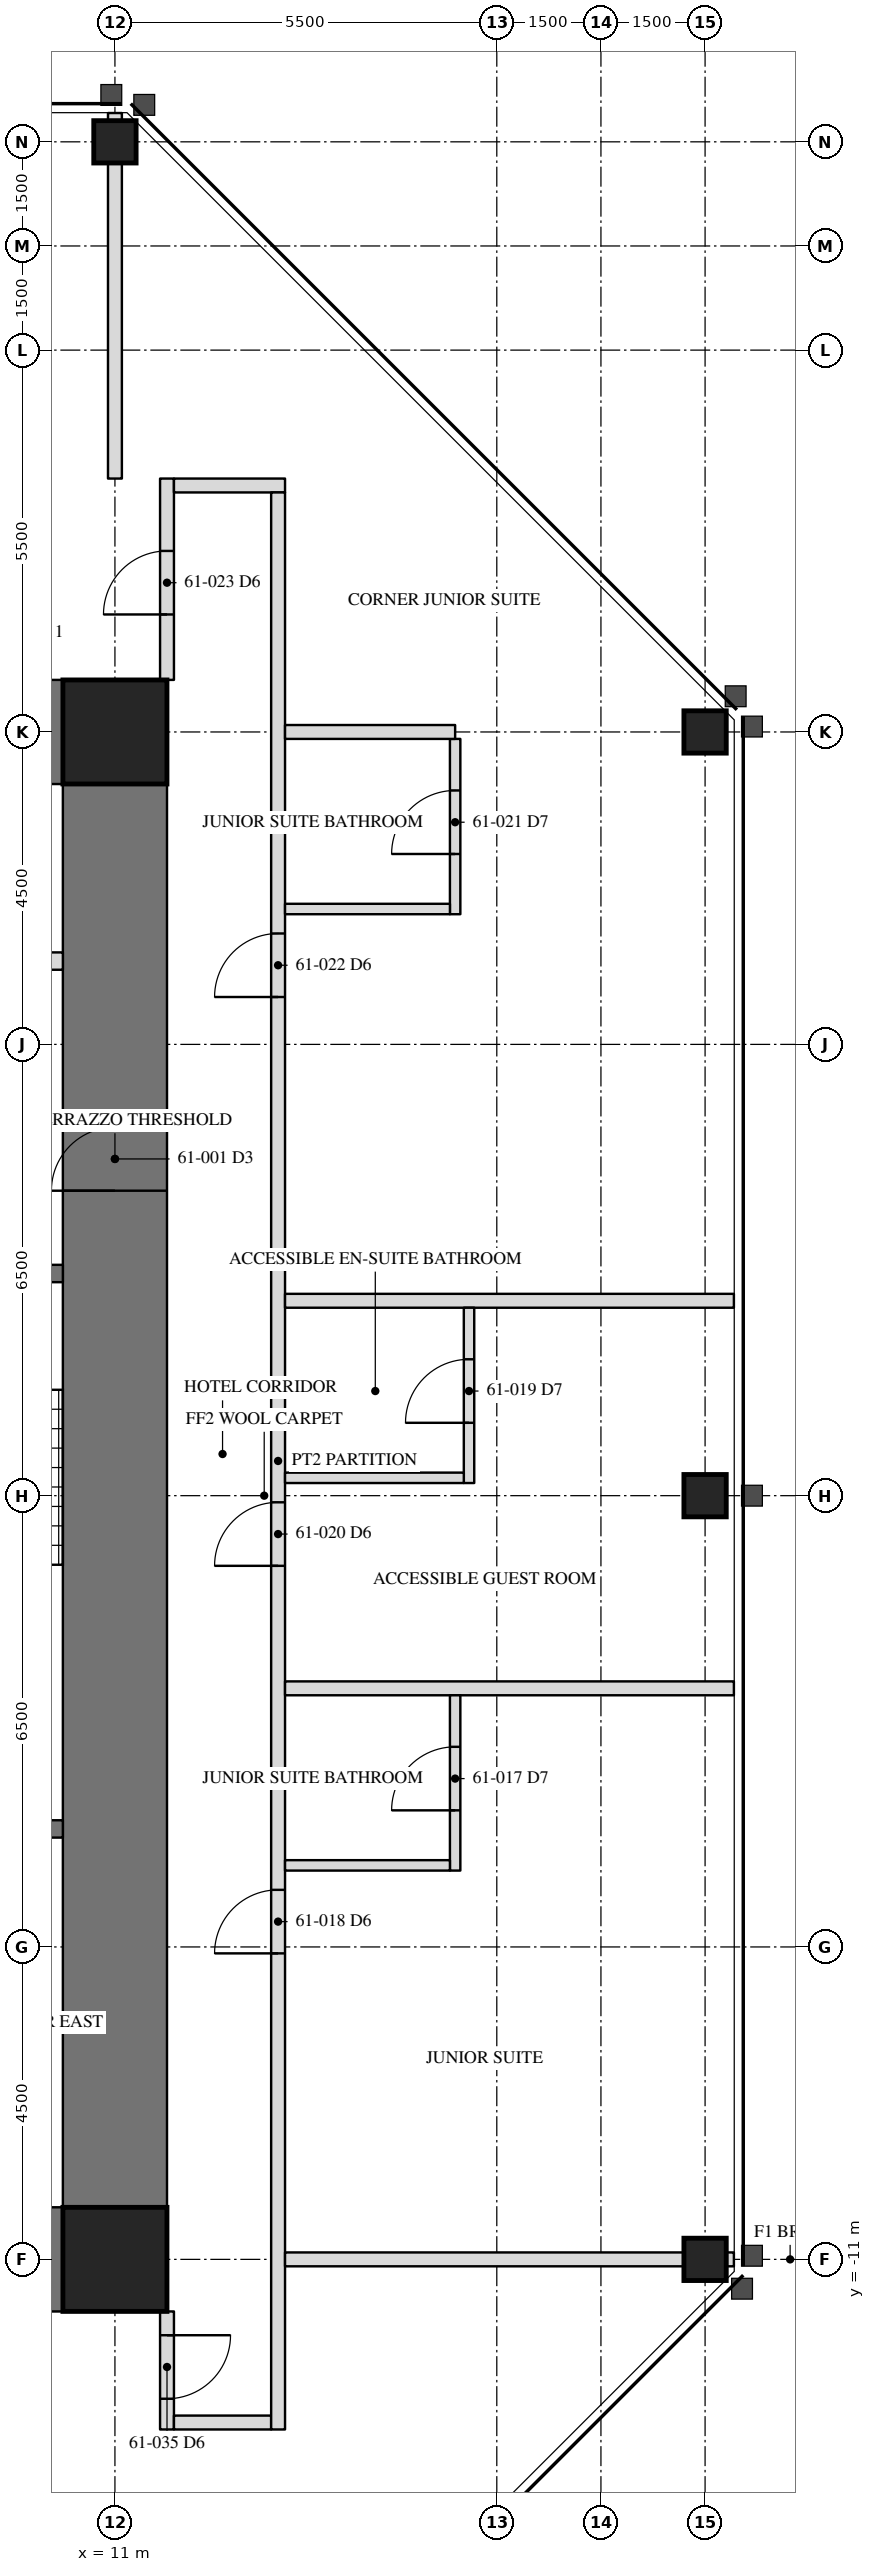
"""IFC4 building model, lengths in metres.
Left out: names, types, materials, properties, quantities, classifications, styles, units other than length and angle.
Written with IfcOpenShell. Run it as: python <this file> out.ifc"""

import sys

from ifc_helpers import new_model, si_unit, direction, frame, frame_2d, origin, origin_2d, place, context, subcontext, project, spatial, rectangle, hollow_rectangle, extrude, element, fill, save


model = new_model("IFC4")
c1 = context("Model", 3, precision=1e-05, world=origin(), true_north=direction((0.0, 1.0)))
c2 = subcontext(c1, "Body", "Model", "MODEL_VIEW")
j1 = project(units=[si_unit("LENGTHUNIT", "METRE"), si_unit("PLANEANGLEUNIT", "RADIAN")], contexts=[c1])
p1 = place(None, origin())
s1 = spatial("IfcSite", under=j1, at=p1, CompositionType="ELEMENT")
p2 = place(p1, origin())
s2 = spatial("IfcBuilding", under=s1, at=p2, CompositionType="ELEMENT")
p3 = place(p2, frame((0.0, 0.0, 250.2)))
s3 = spatial("IfcBuildingStorey", under=s2, at=p3, CompositionType="ELEMENT", Elevation=250.2)
for number, where, z_axis, x_axis in (
    (1, (19.5, -11.0, 0.0), (0.0, 0.0, 1.0), (0.0, 1.0, 0.0)),
    (2, (19.5, 0.0, 0.0), (0.0, 0.0, 1.0), (0.0, 1.0, 0.0)),
    (3, (19.5, 11.0, 0.0), (0.0, 0.0, 1.0), (0.0, 1.0, 0.0)),
    (4, (11.0, 19.5, 0.0), (0.0, 0.0, 1.0), (1.0, 0.0, 0.0)),
):
    element("IfcColumn", number, at=place(p3, frame(where, z_axis=z_axis, x_axis=x_axis)), inside=s3, PredefinedType="COLUMN", context=c2, shape_type="SweptSolid", body=[
        extrude(hollow_rectangle(XDim=0.61, YDim=0.61, WallThickness=0.051, at=origin_2d()), origin(), (0.0, 0.0, 1.0), 3.5),
    ])
p4 = place(p3, frame((11.0, -11.0, 0.0), z_axis=(0.0, 0.0, 1.0), x_axis=(0.0, 1.0, 0.0)))
e5 = element("IfcWall", 5, at=p4, inside=s3, PredefinedType="SHEAR", context=c2, shape_type="SweptSolid", body=[
    extrude(rectangle(XDim=22.0, YDim=1.5, at=frame_2d((11.0, 0.0))), origin(), (0.0, 0.0, 1.0), 3.5),
])
p5 = place(p4, frame((15.393, 0.0, 0.0)))
e6 = element("IfcOpeningElement", 6, at=p5, cuts=e5, PredefinedType="OPENING", context=c2, shape_type="SweptSolid", body=[
    extrude(rectangle(XDim=0.915, YDim=2.134, at=frame_2d((0.458, 1.067))), frame((0.0, 0.76, 0.0), z_axis=(0.0, -1.0, 0.0), x_axis=(1.0, 0.0, 0.0)), (0.0, 0.0, 1.0), 1.52),
])
for number, where, z_axis, x_axis in (
    (7, (11.0, 11.0, 0.0), (0.0, 0.0, 1.0), (-1.0, 0.0, 0.0)),
    (8, (6.5, -11.0, 0.0), (0.0, 0.0, 1.0), (1.0, 0.0, 0.0)),
):
    element("IfcWall", number, at=place(p3, frame(where, z_axis=z_axis, x_axis=x_axis)), inside=s3, PredefinedType="SHEAR", context=c2, shape_type="SweptSolid", body=[
        extrude(rectangle(XDim=4.5, YDim=1.5, at=frame_2d((2.25, 0.0))), origin(), (0.0, 0.0, 1.0), 3.5),
    ])
for number, where, z_axis, x_axis in (
    (9, (11.0, 11.0, 0.0), (0.0, 0.0, 1.0), (1.0, 0.0, 0.0)),
    (10, (11.0, -11.0, 0.0), (0.0, 0.0, 1.0), (1.0, 0.0, 0.0)),
):
    element("IfcColumn", number, at=place(p3, frame(where, z_axis=z_axis, x_axis=x_axis)), inside=s3, PredefinedType="COLUMN", context=c2, shape_type="SweptSolid", body=[
        extrude(hollow_rectangle(XDim=1.499, YDim=1.499, WallThickness=0.102, at=origin_2d()), origin(), (0.0, 0.0, 1.0), 3.5),
    ])
p6 = place(p3, frame((6.95, -4.8, 0.0), z_axis=(0.0, 0.0, 1.0), x_axis=(1.0, 0.0, 0.0)))
e11 = element("IfcWall", 11, at=p6, inside=s3, PredefinedType="SOLIDWALL", context=c2, shape_type="SweptSolid", body=[
    extrude(rectangle(XDim=3.3, YDim=0.25, at=frame_2d((1.65, 0.0))), origin(), (0.0, 0.0, 1.0), 3.31),
])
p7 = place(p3, frame((6.95, 3.2, 0.0), z_axis=(0.0, 0.0, 1.0), x_axis=(1.0, 0.0, 0.0)))
e12 = element("IfcWall", 12, at=p7, inside=s3, PredefinedType="SOLIDWALL", context=c2, shape_type="SweptSolid", body=[
    extrude(rectangle(XDim=3.3, YDim=0.25, at=frame_2d((1.65, 0.0))), origin(), (0.0, 0.0, 1.0), 3.31),
])
p8 = place(p7, frame((1.116, 0.0, 0.0)))
e13 = element("IfcOpeningElement", 13, at=p8, cuts=e12, PredefinedType="OPENING", context=c2, shape_type="SweptSolid", body=[
    extrude(rectangle(XDim=1.067, YDim=2.134, at=frame_2d((0.533, 1.067))), frame((0.0, 0.135, 0.0), z_axis=(0.0, -1.0, 0.0), x_axis=(1.0, 0.0, 0.0)), (0.0, 0.0, 1.0), 0.27),
])
p9 = place(p3, frame((6.95, 7.7, 0.0), z_axis=(0.0, 0.0, 1.0), x_axis=(1.0, 0.0, 0.0)))
e14 = element("IfcWall", 14, at=p9, inside=s3, PredefinedType="PARTITIONING", context=c2, shape_type="SweptSolid", body=[
    extrude(rectangle(XDim=3.3, YDim=0.25, at=frame_2d((1.65, 0.0))), origin(), (0.0, 0.0, 1.0), 3.31),
])
p10 = place(p9, frame((0.45, 0.0, 0.0)))
e15 = element("IfcOpeningElement", 15, at=p10, cuts=e14, PredefinedType="OPENING", context=c2, shape_type="SweptSolid", body=[
    extrude(rectangle(XDim=1.219, YDim=2.134, at=frame_2d((0.609, 1.067))), frame((0.0, 0.135, 0.0), z_axis=(0.0, -1.0, 0.0), x_axis=(1.0, 0.0, 0.0)), (0.0, 0.0, 1.0), 0.27),
])
p11 = place(p3, frame((11.75, 11.75, 0.0), z_axis=(0.0, 0.0, 1.0), x_axis=(0.0, 1.0, 0.0)))
e16 = element("IfcWall", 16, at=p11, inside=s3, PredefinedType="PARTITIONING", context=c2, shape_type="SweptSolid", body=[
    extrude(rectangle(XDim=2.9, YDim=0.2, at=frame_2d((1.45, 0.0))), origin(), (0.0, 0.0, 1.0), 3.31),
])
p12 = place(p11, frame((0.942, 0.0, 0.0)))
e17 = element("IfcOpeningElement", 17, at=p12, cuts=e16, PredefinedType="OPENING", context=c2, shape_type="SweptSolid", body=[
    extrude(rectangle(XDim=0.915, YDim=2.134, at=frame_2d((0.458, 1.067))), frame((0.0, 0.11, 0.0), z_axis=(0.0, -1.0, 0.0), x_axis=(1.0, 0.0, 0.0)), (0.0, 0.0, 1.0), 0.22),
])
p13 = place(p3, frame((13.45, 14.55, 0.0), z_axis=(0.0, 0.0, 1.0), x_axis=(-1.0, 0.0, 0.0)))
e18 = element("IfcWall", 18, at=p13, inside=s3, PredefinedType="PARTITIONING", context=c2, shape_type="SweptSolid", body=[
    extrude(rectangle(XDim=1.6, YDim=0.2, at=frame_2d((0.8, 0.0))), origin(), (0.0, 0.0, 1.0), 3.31),
])
p14 = place(p3, frame((11.75, -11.75, 0.0), z_axis=(0.0, 0.0, 1.0), x_axis=(0.0, -1.0, 0.0)))
e19 = element("IfcWall", 19, at=p14, inside=s3, PredefinedType="PARTITIONING", context=c2, shape_type="SweptSolid", body=[
    extrude(rectangle(XDim=1.7, YDim=0.2, at=frame_2d((0.85, 0.0))), origin(), (0.0, 0.0, 1.0), 3.31),
])
p15 = place(p14, frame((0.343, 0.0, 0.0)))
e20 = element("IfcOpeningElement", 20, at=p15, cuts=e19, PredefinedType="OPENING", context=c2, shape_type="SweptSolid", body=[
    extrude(rectangle(XDim=0.915, YDim=2.134, at=frame_2d((0.458, 1.067))), frame((0.0, 0.11, 0.0), z_axis=(0.0, -1.0, 0.0), x_axis=(1.0, 0.0, 0.0)), (0.0, 0.0, 1.0), 0.22),
])
p16 = place(p3, frame((11.85, -13.35, 0.0), z_axis=(0.0, 0.0, 1.0), x_axis=(1.0, 0.0, 0.0)))
e21 = element("IfcWall", 21, at=p16, inside=s3, PredefinedType="PARTITIONING", context=c2, shape_type="SweptSolid", body=[
    extrude(rectangle(XDim=1.4, YDim=0.2, at=frame_2d((0.7, 0.0))), origin(), (0.0, 0.0, 1.0), 3.31),
])
p17 = place(p3, frame((13.35, -13.45, 0.0), z_axis=(0.0, 0.0, 1.0), x_axis=(0.0, 1.0, 0.0)))
e22 = element("IfcWall", 22, at=p17, inside=s3, PredefinedType="PARTITIONING", context=c2, shape_type="SweptSolid", body=[
    extrude(rectangle(XDim=27.9, YDim=0.2, at=frame_2d((13.95, 0.0))), origin(), (0.0, 0.0, 1.0), 3.31),
])
p18 = place(p17, frame((6.857, 0.0, 0.0)))
e23 = element("IfcOpeningElement", 23, at=p18, cuts=e22, PredefinedType="OPENING", context=c2, shape_type="SweptSolid", body=[
    extrude(rectangle(XDim=0.915, YDim=2.134, at=frame_2d((0.458, 1.067))), frame((0.0, 0.11, 0.0), z_axis=(0.0, -1.0, 0.0), x_axis=(1.0, 0.0, 0.0)), (0.0, 0.0, 1.0), 0.22),
])
p19 = place(p17, frame((12.439, 0.0, 0.0)))
e24 = element("IfcOpeningElement", 24, at=p19, cuts=e22, PredefinedType="OPENING", context=c2, shape_type="SweptSolid", body=[
    extrude(rectangle(XDim=0.915, YDim=2.134, at=frame_2d((0.458, 1.067))), frame((0.0, 0.11, 0.0), z_axis=(0.0, -1.0, 0.0), x_axis=(1.0, 0.0, 0.0)), (0.0, 0.0, 1.0), 0.22),
])
p20 = place(p17, frame((20.633, 0.0, 0.0)))
e25 = element("IfcOpeningElement", 25, at=p20, cuts=e22, PredefinedType="OPENING", context=c2, shape_type="SweptSolid", body=[
    extrude(rectangle(XDim=0.915, YDim=2.134, at=frame_2d((0.458, 1.067))), frame((0.0, 0.11, 0.0), z_axis=(0.0, -1.0, 0.0), x_axis=(1.0, 0.0, 0.0)), (0.0, 0.0, 1.0), 0.22),
])
p21 = place(p3, frame((13.45, -11.0, 0.0), z_axis=(0.0, 0.0, 1.0), x_axis=(1.0, 0.0, 0.0)))
e26 = element("IfcWall", 26, at=p21, inside=s3, PredefinedType="PARTITIONING", context=c2, shape_type="SweptSolid", body=[
    extrude(rectangle(XDim=6.465, YDim=0.2, at=frame_2d((3.232, 0.0))), origin(), (0.0, 0.0, 1.0), 2.802),
])
for number, where, z_axis, x_axis in (
    (27, (13.45, -2.775, 0.0), (0.0, 0.0, 1.0), (1.0, 0.0, 0.0)),
    (28, (13.45, 2.807, 0.0), (0.0, 0.0, 1.0), (1.0, 0.0, 0.0)),
):
    element("IfcWall", number, at=place(p3, frame(where, z_axis=z_axis, x_axis=x_axis)), inside=s3, PredefinedType="PARTITIONING", context=c2, shape_type="SweptSolid", body=[
        extrude(rectangle(XDim=6.465, YDim=0.2, at=frame_2d((3.232, 0.0))), origin(), (0.0, 0.0, 1.0), 3.31),
    ])
p22 = place(p3, frame((15.9, -5.4, 0.0), z_axis=(0.0, 0.0, 1.0), x_axis=(0.0, 1.0, 0.0)))
e29 = element("IfcWall", 29, at=p22, inside=s3, PredefinedType="PARTITIONING", context=c2, shape_type="SweptSolid", body=[
    extrude(rectangle(XDim=2.525, YDim=0.15, at=frame_2d((1.262, 0.0))), origin(), (0.0, 0.0, 1.0), 3.31),
])
p23 = place(p22, frame((0.867, 0.0, 0.0)))
e30 = element("IfcOpeningElement", 30, at=p23, cuts=e29, PredefinedType="OPENING", context=c2, shape_type="SweptSolid", body=[
    extrude(rectangle(XDim=0.915, YDim=2.032, at=frame_2d((0.458, 1.016))), frame((0.0, 0.085, 0.0), z_axis=(0.0, -1.0, 0.0), x_axis=(1.0, 0.0, 0.0)), (0.0, 0.0, 1.0), 0.17),
])
p24 = place(p3, frame((13.45, -5.325, 0.0), z_axis=(0.0, 0.0, 1.0), x_axis=(1.0, 0.0, 0.0)))
e31 = element("IfcWall", 31, at=p24, inside=s3, PredefinedType="PARTITIONING", context=c2, shape_type="SweptSolid", body=[
    extrude(rectangle(XDim=2.375, YDim=0.15, at=frame_2d((1.188, 0.0))), origin(), (0.0, 0.0, 1.0), 3.31),
])
p25 = place(p3, frame((16.1, 0.182, 0.0), z_axis=(0.0, 0.0, 1.0), x_axis=(0.0, 1.0, 0.0)))
e32 = element("IfcWall", 32, at=p25, inside=s3, PredefinedType="PARTITIONING", context=c2, shape_type="SweptSolid", body=[
    extrude(rectangle(XDim=2.525, YDim=0.15, at=frame_2d((1.263, 0.0))), origin(), (0.0, 0.0, 1.0), 3.31),
])
p26 = place(p25, frame((0.867, 0.0, 0.0)))
e33 = element("IfcOpeningElement", 33, at=p26, cuts=e32, PredefinedType="OPENING", context=c2, shape_type="SweptSolid", body=[
    extrude(rectangle(XDim=0.915, YDim=2.032, at=frame_2d((0.458, 1.016))), frame((0.0, 0.085, 0.0), z_axis=(0.0, -1.0, 0.0), x_axis=(1.0, 0.0, 0.0)), (0.0, 0.0, 1.0), 0.17),
])
p27 = place(p3, frame((13.45, 0.257, 0.0), z_axis=(0.0, 0.0, 1.0), x_axis=(1.0, 0.0, 0.0)))
e34 = element("IfcWall", 34, at=p27, inside=s3, PredefinedType="PARTITIONING", context=c2, shape_type="SweptSolid", body=[
    extrude(rectangle(XDim=2.575, YDim=0.15, at=frame_2d((1.288, 0.0))), origin(), (0.0, 0.0, 1.0), 3.31),
])
p28 = place(p3, frame((15.9, 8.375, 0.0), z_axis=(0.0, 0.0, 1.0), x_axis=(0.0, 1.0, 0.0)))
e35 = element("IfcWall", 35, at=p28, inside=s3, PredefinedType="PARTITIONING", context=c2, shape_type="SweptSolid", body=[
    extrude(rectangle(XDim=2.525, YDim=0.15, at=frame_2d((1.262, 0.0))), origin(), (0.0, 0.0, 1.0), 3.31),
])
p29 = place(p28, frame((0.867, 0.0, 0.0)))
e36 = element("IfcOpeningElement", 36, at=p29, cuts=e35, PredefinedType="OPENING", context=c2, shape_type="SweptSolid", body=[
    extrude(rectangle(XDim=0.915, YDim=2.032, at=frame_2d((0.458, 1.016))), frame((0.0, 0.085, 0.0), z_axis=(0.0, -1.0, 0.0), x_axis=(1.0, 0.0, 0.0)), (0.0, 0.0, 1.0), 0.17),
])
p30 = place(p3, frame((13.45, 8.45, 0.0), z_axis=(0.0, 0.0, 1.0), x_axis=(1.0, 0.0, 0.0)))
e37 = element("IfcWall", 37, at=p30, inside=s3, PredefinedType="PARTITIONING", context=c2, shape_type="SweptSolid", body=[
    extrude(rectangle(XDim=2.375, YDim=0.15, at=frame_2d((1.188, 0.0))), origin(), (0.0, 0.0, 1.0), 3.31),
])
p31 = place(p3, frame((13.45, 11.0, 0.0), z_axis=(0.0, 0.0, 1.0), x_axis=(1.0, 0.0, 0.0)))
e38 = element("IfcWall", 38, at=p31, inside=s3, PredefinedType="PARTITIONING", context=c2, shape_type="SweptSolid", body=[
    extrude(rectangle(XDim=2.45, YDim=0.2, at=frame_2d((1.225, 0.0))), origin(), (0.0, 0.0, 1.0), 2.802),
])
p32 = place(p3, frame((11.0, 14.65, 0.0), z_axis=(0.0, 0.0, 1.0), x_axis=(0.0, 1.0, 0.0)))
e39 = element("IfcWall", 39, at=p32, inside=s3, PredefinedType="PARTITIONING", context=c2, shape_type="SweptSolid", body=[
    extrude(rectangle(XDim=5.265, YDim=0.2, at=frame_2d((2.633, 0.0))), origin(), (0.0, 0.0, 1.0), 2.802),
])
p33 = place(p5, origin())
e40 = element("IfcDoor", 40, at=p33, inside=s3, OperationType="SINGLE_SWING_RIGHT", PredefinedType="DOOR", context=c2, shape_type="SweptSolid", body=[
    extrude(rectangle(XDim=0.915, YDim=2.134, at=frame_2d((0.458, 1.067))), frame((0.0, -0.675, 0.0), z_axis=(0.0, -1.0, 0.0), x_axis=(1.0, 0.0, 0.0)), (0.0, 0.0, 1.0), 0.05),
])
fill(e6, e40)
p34 = place(p23, origin())
e41 = element("IfcDoor", 41, at=p34, inside=s3, OperationType="SINGLE_SWING_LEFT", PredefinedType="DOOR", context=c2, shape_type="SweptSolid", body=[
    extrude(rectangle(XDim=0.915, YDim=2.032, at=frame_2d((0.458, 1.016))), frame((0.0, 0.025, 0.0), z_axis=(0.0, -1.0, 0.0), x_axis=(1.0, 0.0, 0.0)), (0.0, 0.0, 1.0), 0.05),
])
fill(e30, e41)
p35 = place(p18, origin())
e42 = element("IfcDoor", 42, at=p35, inside=s3, OperationType="SINGLE_SWING_LEFT", PredefinedType="DOOR", context=c2, shape_type="SweptSolid", body=[
    extrude(rectangle(XDim=0.915, YDim=2.134, at=frame_2d((0.458, 1.067))), frame((0.0, 0.025, 0.0), z_axis=(0.0, -1.0, 0.0), x_axis=(1.0, 0.0, 0.0)), (0.0, 0.0, 1.0), 0.05),
])
fill(e23, e42)
p36 = place(p26, origin())
e43 = element("IfcDoor", 43, at=p36, inside=s3, OperationType="SINGLE_SWING_LEFT", PredefinedType="DOOR", context=c2, shape_type="SweptSolid", body=[
    extrude(rectangle(XDim=0.915, YDim=2.032, at=frame_2d((0.458, 1.016))), frame((0.0, 0.025, 0.0), z_axis=(0.0, -1.0, 0.0), x_axis=(1.0, 0.0, 0.0)), (0.0, 0.0, 1.0), 0.05),
])
fill(e33, e43)
p37 = place(p19, origin())
e44 = element("IfcDoor", 44, at=p37, inside=s3, OperationType="SINGLE_SWING_LEFT", PredefinedType="DOOR", context=c2, shape_type="SweptSolid", body=[
    extrude(rectangle(XDim=0.915, YDim=2.134, at=frame_2d((0.458, 1.067))), frame((0.0, 0.025, 0.0), z_axis=(0.0, -1.0, 0.0), x_axis=(1.0, 0.0, 0.0)), (0.0, 0.0, 1.0), 0.05),
])
fill(e24, e44)
p38 = place(p29, origin())
e45 = element("IfcDoor", 45, at=p38, inside=s3, OperationType="SINGLE_SWING_LEFT", PredefinedType="DOOR", context=c2, shape_type="SweptSolid", body=[
    extrude(rectangle(XDim=0.915, YDim=2.032, at=frame_2d((0.458, 1.016))), frame((0.0, 0.025, 0.0), z_axis=(0.0, -1.0, 0.0), x_axis=(1.0, 0.0, 0.0)), (0.0, 0.0, 1.0), 0.05),
])
fill(e36, e45)
p39 = place(p20, origin())
e46 = element("IfcDoor", 46, at=p39, inside=s3, OperationType="SINGLE_SWING_LEFT", PredefinedType="DOOR", context=c2, shape_type="SweptSolid", body=[
    extrude(rectangle(XDim=0.915, YDim=2.134, at=frame_2d((0.458, 1.067))), frame((0.0, 0.025, 0.0), z_axis=(0.0, -1.0, 0.0), x_axis=(1.0, 0.0, 0.0)), (0.0, 0.0, 1.0), 0.05),
])
fill(e25, e46)
p40 = place(p12, origin())
e47 = element("IfcDoor", 47, at=p40, inside=s3, OperationType="SINGLE_SWING_LEFT", PredefinedType="DOOR", context=c2, shape_type="SweptSolid", body=[
    extrude(rectangle(XDim=0.915, YDim=2.134, at=frame_2d((0.458, 1.067))), frame((0.0, 0.025, 0.0), z_axis=(0.0, -1.0, 0.0), x_axis=(1.0, 0.0, 0.0)), (0.0, 0.0, 1.0), 0.05),
])
fill(e17, e47)
p41 = place(p15, origin())
e48 = element("IfcDoor", 48, at=p41, inside=s3, OperationType="SINGLE_SWING_LEFT", PredefinedType="DOOR", context=c2, shape_type="SweptSolid", body=[
    extrude(rectangle(XDim=0.915, YDim=2.134, at=frame_2d((0.458, 1.067))), frame((0.0, 0.025, 0.0), z_axis=(0.0, -1.0, 0.0), x_axis=(1.0, 0.0, 0.0)), (0.0, 0.0, 1.0), 0.05),
])
fill(e20, e48)
save(model, sys.argv[1])
